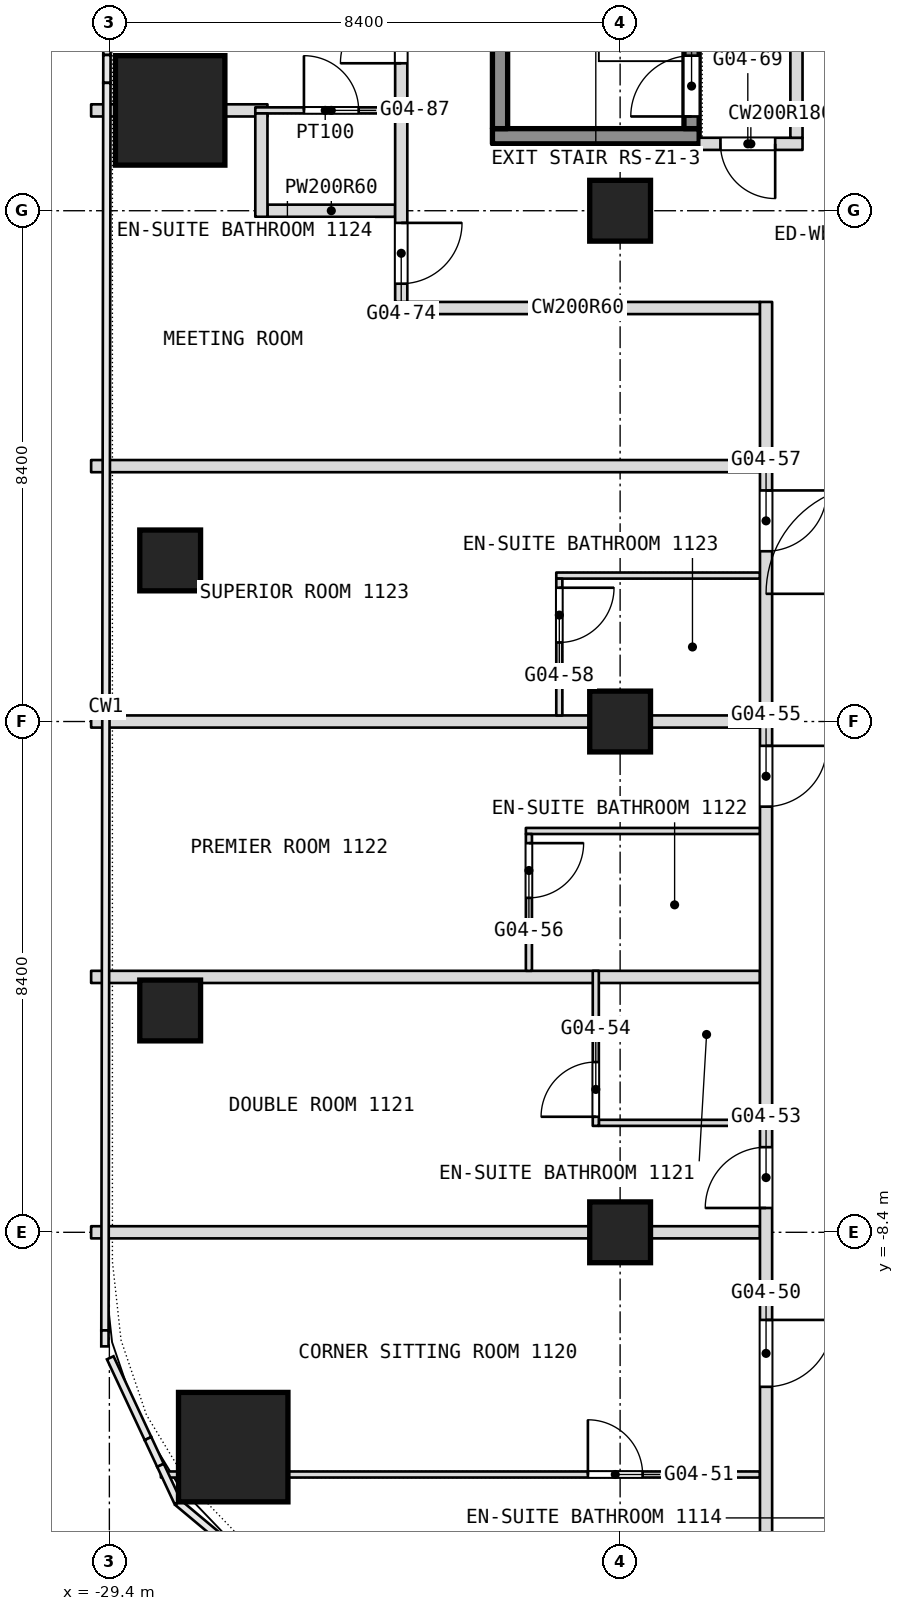
"""IFC4 building model, lengths in metres.
Left out: names, types, materials, properties, quantities, classifications, styles, units other than length and angle.
Written with IfcOpenShell. Run it as: python <this file> out.ifc"""

import sys

from ifc_helpers import new_model, si_unit, direction, frame, frame_2d, origin, origin_2d, place, context, subcontext, project, spatial, rectangle, extrude, element, fill, save


model = new_model("IFC4")
c1 = context("Model", 3, precision=1e-05, world=origin(), true_north=direction((0.0, 1.0)))
c2 = subcontext(c1, "Body", "Model", "MODEL_VIEW")
j1 = project(units=[si_unit("LENGTHUNIT", "METRE"), si_unit("PLANEANGLEUNIT", "RADIAN")], contexts=[c1])
p1 = place(None, origin())
s1 = spatial("IfcSite", under=j1, at=p1, CompositionType="ELEMENT")
p2 = place(p1, origin())
s2 = spatial("IfcBuilding", under=s1, at=p2, CompositionType="ELEMENT")
p3 = place(p2, frame((0.0, 0.0, 54.5)))
s3 = spatial("IfcBuildingStorey", under=s2, at=p3, CompositionType="ELEMENT", Elevation=54.5)
for number, where, z_axis, x_axis in (
    (1, (-27.363, -11.933, 0.0), (0.0, 0.0, 1.0), (1.0, 0.0, 0.0)),
    (2, (-28.4, 10.05, 0.0), (0.0, 0.0, 1.0), (1.0, 0.0, 0.0)),
):
    element("IfcColumn", number, at=place(p3, frame(where, z_axis=z_axis, x_axis=x_axis)), inside=s3, PredefinedType="COLUMN", context=c2, shape_type="SweptSolid", body=[
        extrude(rectangle(XDim=1.8, YDim=1.8, at=origin_2d()), origin(), (0.0, 0.0, 1.0), 3.6),
    ])
for number, where, z_axis, x_axis in (
    (3, (-21.0, -8.4, 0.0), (0.0, 0.0, 1.0), (1.0, 0.0, 0.0)),
    (4, (-21.0, 0.0, 0.0), (0.0, 0.0, 1.0), (1.0, 0.0, 0.0)),
    (5, (-21.0, 8.4, 0.0), (0.0, 0.0, 1.0), (1.0, 0.0, 0.0)),
    (6, (-28.4, -4.752, 0.0), (0.0, 0.0, 1.0), (1.0, 0.0, 0.0)),
    (7, (-28.4, 2.649, 0.0), (0.0, 0.0, 1.0), (1.0, 0.0, 0.0)),
):
    element("IfcColumn", number, at=place(p3, frame(where, z_axis=z_axis, x_axis=x_axis)), inside=s3, PredefinedType="COLUMN", context=c2, shape_type="SweptSolid", body=[
        extrude(rectangle(XDim=1.0, YDim=1.0, at=origin_2d()), origin(), (0.0, 0.0, 1.0), 3.6),
    ])
p4 = place(p3, frame((-28.553, -12.383, 0.0), z_axis=(0.0, 0.0, 1.0), x_axis=(1.0, 0.0, 0.0)))
e8 = element("IfcWall", 8, at=p4, inside=s3, PredefinedType="PARTITIONING", context=c2, shape_type="SweptSolid", body=[
    extrude(rectangle(XDim=0.29, YDim=0.1, at=frame_2d((0.145, 0.0))), origin(), (0.0, 0.0, 1.0), 3.34),
])
p5 = place(p3, frame((-26.463, -12.383, 0.0), z_axis=(0.0, 0.0, 1.0), x_axis=(1.0, 0.0, 0.0)))
e9 = element("IfcWall", 9, at=p5, inside=s3, PredefinedType="PARTITIONING", context=c2, shape_type="SweptSolid", body=[
    extrude(rectangle(XDim=7.763, YDim=0.1, at=frame_2d((3.881, 0.0))), origin(), (0.0, 0.0, 1.0), 3.34),
])
p6 = place(p5, frame((4.933, 0.0, 0.0)))
e10 = element("IfcOpeningElement", 10, at=p6, cuts=e9, PredefinedType="OPENING", context=c2, shape_type="SweptSolid", body=[
    extrude(rectangle(XDim=0.9, YDim=2.1, at=frame_2d((0.45, 1.05))), frame((0.0, 0.05, 0.0), z_axis=(0.0, -1.0, 0.0), x_axis=(1.0, 0.0, 0.0)), (0.0, 0.0, 1.0), 0.1),
])
p7 = place(p3, frame((-29.7, -8.4, 0.0), z_axis=(0.0, 0.0, 1.0), x_axis=(1.0, 0.0, 0.0)))
e11 = element("IfcWall", 11, at=p7, inside=s3, PredefinedType="PARTITIONING", context=c2, shape_type="SweptSolid", body=[
    extrude(rectangle(XDim=11.0, YDim=0.2, at=frame_2d((5.5, 0.0))), origin(), (0.0, 0.0, 1.0), 2.84),
])
p8 = place(p3, frame((-21.35, -6.6, 0.0), z_axis=(0.0, 0.0, 1.0), x_axis=(1.0, 0.0, 0.0)))
e12 = element("IfcWall", 12, at=p8, inside=s3, PredefinedType="PARTITIONING", context=c2, shape_type="SweptSolid", body=[
    extrude(rectangle(XDim=2.65, YDim=0.1, at=frame_2d((1.325, 0.0))), origin(), (0.0, 0.0, 1.0), 3.34),
])
p9 = place(p3, frame((-29.7, -4.2, 0.0), z_axis=(0.0, 0.0, 1.0), x_axis=(1.0, 0.0, 0.0)))
e13 = element("IfcWall", 13, at=p9, inside=s3, PredefinedType="PARTITIONING", context=c2, shape_type="SweptSolid", body=[
    extrude(rectangle(XDim=11.0, YDim=0.2, at=frame_2d((5.5, 0.0))), origin(), (0.0, 0.0, 1.0), 3.34),
])
p10 = place(p3, frame((-22.55, -1.8, 0.0), z_axis=(0.0, 0.0, 1.0), x_axis=(1.0, 0.0, 0.0)))
e14 = element("IfcWall", 14, at=p10, inside=s3, PredefinedType="PARTITIONING", context=c2, shape_type="SweptSolid", body=[
    extrude(rectangle(XDim=3.85, YDim=0.1, at=frame_2d((1.925, 0.0))), origin(), (0.0, 0.0, 1.0), 3.34),
])
p11 = place(p3, frame((-29.7, 0.0, 0.0), z_axis=(0.0, 0.0, 1.0), x_axis=(1.0, 0.0, 0.0)))
e15 = element("IfcWall", 15, at=p11, inside=s3, PredefinedType="PARTITIONING", context=c2, shape_type="SweptSolid", body=[
    extrude(rectangle(XDim=11.0, YDim=0.2, at=frame_2d((5.5, 0.0))), origin(), (0.0, 0.0, 1.0), 2.84),
])
p12 = place(p3, frame((-22.05, 2.4, 0.0), z_axis=(0.0, 0.0, 1.0), x_axis=(1.0, 0.0, 0.0)))
e16 = element("IfcWall", 16, at=p12, inside=s3, PredefinedType="PARTITIONING", context=c2, shape_type="SweptSolid", body=[
    extrude(rectangle(XDim=3.35, YDim=0.1, at=frame_2d((1.675, 0.0))), origin(), (0.0, 0.0, 1.0), 3.34),
])
p13 = place(p3, frame((-29.7, 4.2, 0.0), z_axis=(0.0, 0.0, 1.0), x_axis=(1.0, 0.0, 0.0)))
e17 = element("IfcWall", 17, at=p13, inside=s3, PredefinedType="PARTITIONING", context=c2, shape_type="SweptSolid", body=[
    extrude(rectangle(XDim=11.0, YDim=0.2, at=frame_2d((5.5, 0.0))), origin(), (0.0, 0.0, 1.0), 3.34),
])
p14 = place(p3, frame((-24.7, 6.8, 0.0), z_axis=(0.0, 0.0, 1.0), x_axis=(1.0, 0.0, 0.0)))
e18 = element("IfcWall", 18, at=p14, inside=s3, PredefinedType="PARTITIONING", context=c2, shape_type="SweptSolid", body=[
    extrude(rectangle(XDim=6.0, YDim=0.2, at=frame_2d((3.0, 0.0))), origin(), (0.0, 0.0, 1.0), 3.34),
])
p15 = place(p3, frame((-26.8, 8.4, 0.0), z_axis=(0.0, 0.0, 1.0), x_axis=(1.0, 0.0, 0.0)))
e19 = element("IfcWall", 19, at=p15, inside=s3, PredefinedType="PARTITIONING", context=c2, shape_type="SweptSolid", body=[
    extrude(rectangle(XDim=2.1, YDim=0.2, at=frame_2d((1.05, 0.0))), origin(), (0.0, 0.0, 1.0), 2.84),
])
p16 = place(p3, frame((-19.7, 9.5, 0.0), z_axis=(0.0, 0.0, 1.0), x_axis=(1.0, 0.0, 0.0)))
e20 = element("IfcWall", 20, at=p16, inside=s3, PredefinedType="PARTITIONING", context=c2, shape_type="SweptSolid", body=[
    extrude(rectangle(XDim=1.7, YDim=0.2, at=frame_2d((0.85, 0.0))), origin(), (0.0, 0.0, 1.0), 3.34),
])
p17 = place(p16, frame((0.35, 0.0, 0.0)))
e21 = element("IfcOpeningElement", 21, at=p17, cuts=e20, PredefinedType="OPENING", context=c2, shape_type="SweptSolid", body=[
    extrude(rectangle(XDim=0.9, YDim=2.1, at=frame_2d((0.45, 1.05))), frame((0.0, 0.1, 0.0), z_axis=(0.0, -1.0, 0.0), x_axis=(1.0, 0.0, 0.0)), (0.0, 0.0, 1.0), 0.2),
])
p18 = place(p3, frame((-29.7, 10.05, 0.0), z_axis=(0.0, 0.0, 1.0), x_axis=(1.0, 0.0, 0.0)))
e22 = element("IfcWall", 22, at=p18, inside=s3, PredefinedType="PARTITIONING", context=c2, shape_type="SweptSolid", body=[
    extrude(rectangle(XDim=0.4, YDim=0.2, at=frame_2d((0.2, 0.0))), origin(), (0.0, 0.0, 1.0), 3.34),
])
p19 = place(p3, frame((-27.5, 10.05, 0.0), z_axis=(0.0, 0.0, 1.0), x_axis=(1.0, 0.0, 0.0)))
e23 = element("IfcWall", 23, at=p19, inside=s3, PredefinedType="PARTITIONING", context=c2, shape_type="SweptSolid", body=[
    extrude(rectangle(XDim=0.7, YDim=0.2, at=frame_2d((0.35, 0.0))), origin(), (0.0, 0.0, 1.0), 3.34),
])
p20 = place(p3, frame((-27.0, 10.05, 0.0), z_axis=(0.0, 0.0, 1.0), x_axis=(1.0, 0.0, 0.0)))
e24 = element("IfcWall", 24, at=p20, inside=s3, PredefinedType="PARTITIONING", context=c2, shape_type="SweptSolid", body=[
    extrude(rectangle(XDim=2.3, YDim=0.1, at=frame_2d((1.15, 0.0))), origin(), (0.0, 0.0, 1.0), 3.34),
])
p21 = place(p20, frame((0.8, 0.0, 0.0)))
e25 = element("IfcOpeningElement", 25, at=p21, cuts=e24, PredefinedType="OPENING", context=c2, shape_type="SweptSolid", body=[
    extrude(rectangle(XDim=0.9, YDim=2.1, at=frame_2d((0.45, 1.05))), frame((0.0, 0.05, 0.0), z_axis=(0.0, -1.0, 0.0), x_axis=(1.0, 0.0, 0.0)), (0.0, 0.0, 1.0), 0.1),
])
p22 = place(p3, frame((-18.1, 9.6, 0.0), z_axis=(0.0, 0.0, 1.0), x_axis=(0.0, 1.0, 0.0)))
e26 = element("IfcWall", 26, at=p22, inside=s3, PredefinedType="PARTITIONING", context=c2, shape_type="SweptSolid", body=[
    extrude(rectangle(XDim=6.2, YDim=0.2, at=frame_2d((3.1, 0.0))), origin(), (0.0, 0.0, 1.0), 3.34),
])
p23 = place(p3, frame((-18.6, -16.665, 0.0), z_axis=(0.0, 0.0, 1.0), x_axis=(0.0, 1.0, 0.0)))
e27 = element("IfcWall", 27, at=p23, inside=s3, PredefinedType="PARTITIONING", context=c2, shape_type="SweptSolid", body=[
    extrude(rectangle(XDim=23.565, YDim=0.2, at=frame_2d((11.782, 0.0))), origin(), (0.0, 0.0, 1.0), 3.34),
])
p24 = place(p23, frame((5.724, 0.0, 0.0)))
e28 = element("IfcOpeningElement", 28, at=p24, cuts=e27, PredefinedType="OPENING", context=c2, shape_type="SweptSolid", body=[
    extrude(rectangle(XDim=1.1, YDim=2.1, at=frame_2d((0.55, 1.05))), frame((0.0, 0.1, 0.0), z_axis=(0.0, -1.0, 0.0), x_axis=(1.0, 0.0, 0.0)), (0.0, 0.0, 1.0), 0.2),
])
p25 = place(p23, frame((8.665, 0.0, 0.0)))
e29 = element("IfcOpeningElement", 29, at=p25, cuts=e27, PredefinedType="OPENING", context=c2, shape_type="SweptSolid", body=[
    extrude(rectangle(XDim=1.0, YDim=2.1, at=frame_2d((0.5, 1.05))), frame((0.0, 0.1, 0.0), z_axis=(0.0, -1.0, 0.0), x_axis=(1.0, 0.0, 0.0)), (0.0, 0.0, 1.0), 0.2),
])
p26 = place(p23, frame((15.265, 0.0, 0.0)))
e30 = element("IfcOpeningElement", 30, at=p26, cuts=e27, PredefinedType="OPENING", context=c2, shape_type="SweptSolid", body=[
    extrude(rectangle(XDim=1.0, YDim=2.1, at=frame_2d((0.5, 1.05))), frame((0.0, 0.1, 0.0), z_axis=(0.0, -1.0, 0.0), x_axis=(1.0, 0.0, 0.0)), (0.0, 0.0, 1.0), 0.2),
])
p27 = place(p23, frame((19.465, 0.0, 0.0)))
e31 = element("IfcOpeningElement", 31, at=p27, cuts=e27, PredefinedType="OPENING", context=c2, shape_type="SweptSolid", body=[
    extrude(rectangle(XDim=1.0, YDim=2.1, at=frame_2d((0.5, 1.05))), frame((0.0, 0.1, 0.0), z_axis=(0.0, -1.0, 0.0), x_axis=(1.0, 0.0, 0.0)), (0.0, 0.0, 1.0), 0.2),
])
p28 = place(p3, frame((-21.4, -6.65, 0.0), z_axis=(0.0, 0.0, 1.0), x_axis=(0.0, 1.0, 0.0)))
e32 = element("IfcWall", 32, at=p28, inside=s3, PredefinedType="PARTITIONING", context=c2, shape_type="SweptSolid", body=[
    extrude(rectangle(XDim=2.55, YDim=0.1, at=frame_2d((1.275, 0.0))), origin(), (0.0, 0.0, 1.0), 3.34),
])
p29 = place(p28, frame((0.15, 0.0, 0.0)))
e33 = element("IfcOpeningElement", 33, at=p29, cuts=e32, PredefinedType="OPENING", context=c2, shape_type="SweptSolid", body=[
    extrude(rectangle(XDim=0.9, YDim=2.1, at=frame_2d((0.45, 1.05))), frame((0.0, 0.05, 0.0), z_axis=(0.0, -1.0, 0.0), x_axis=(1.0, 0.0, 0.0)), (0.0, 0.0, 1.0), 0.1),
])
p30 = place(p3, frame((-22.0, 0.1, 0.0), z_axis=(0.0, 0.0, 1.0), x_axis=(0.0, 1.0, 0.0)))
e34 = element("IfcWall", 34, at=p30, inside=s3, PredefinedType="PARTITIONING", context=c2, shape_type="SweptSolid", body=[
    extrude(rectangle(XDim=2.25, YDim=0.1, at=frame_2d((1.125, 0.0))), origin(), (0.0, 0.0, 1.0), 3.34),
])
p31 = place(p30, frame((1.2, 0.0, 0.0)))
e35 = element("IfcOpeningElement", 35, at=p31, cuts=e34, PredefinedType="OPENING", context=c2, shape_type="SweptSolid", body=[
    extrude(rectangle(XDim=0.9, YDim=2.1, at=frame_2d((0.45, 1.05))), frame((0.0, 0.05, 0.0), z_axis=(0.0, -1.0, 0.0), x_axis=(1.0, 0.0, 0.0)), (0.0, 0.0, 1.0), 0.1),
])
p32 = place(p3, frame((-22.5, -4.1, 0.0), z_axis=(0.0, 0.0, 1.0), x_axis=(0.0, 1.0, 0.0)))
e36 = element("IfcWall", 36, at=p32, inside=s3, PredefinedType="PARTITIONING", context=c2, shape_type="SweptSolid", body=[
    extrude(rectangle(XDim=2.25, YDim=0.1, at=frame_2d((1.125, 0.0))), origin(), (0.0, 0.0, 1.0), 3.34),
])
p33 = place(p32, frame((1.2, 0.0, 0.0)))
e37 = element("IfcOpeningElement", 37, at=p33, cuts=e36, PredefinedType="OPENING", context=c2, shape_type="SweptSolid", body=[
    extrude(rectangle(XDim=0.9, YDim=2.1, at=frame_2d((0.45, 1.05))), frame((0.0, 0.05, 0.0), z_axis=(0.0, -1.0, 0.0), x_axis=(1.0, 0.0, 0.0)), (0.0, 0.0, 1.0), 0.1),
])
p34 = place(p3, frame((-24.6, 6.9, 0.0), z_axis=(0.0, 0.0, 1.0), x_axis=(0.0, 1.0, 0.0)))
e38 = element("IfcWall", 38, at=p34, inside=s3, PredefinedType="PARTITIONING", context=c2, shape_type="SweptSolid", body=[
    extrude(rectangle(XDim=11.6, YDim=0.2, at=frame_2d((5.8, 0.0))), origin(), (0.0, 0.0, 1.0), 3.34),
])
p35 = place(p34, frame((8.5, 0.0, 0.0)))
e39 = element("IfcOpeningElement", 39, at=p35, cuts=e38, PredefinedType="OPENING", context=c2, shape_type="SweptSolid", body=[
    extrude(rectangle(XDim=1.0, YDim=2.1, at=frame_2d((0.5, 1.05))), frame((0.0, 0.1, 0.0), z_axis=(0.0, -1.0, 0.0), x_axis=(1.0, 0.0, 0.0)), (0.0, 0.0, 1.0), 0.2),
])
p36 = place(p34, frame((10.2, 0.0, 0.0)))
e40 = element("IfcOpeningElement", 40, at=p36, cuts=e38, PredefinedType="OPENING", context=c2, shape_type="SweptSolid", body=[
    extrude(rectangle(XDim=1.0, YDim=2.1, at=frame_2d((0.5, 1.05))), frame((0.0, 0.1, 0.0), z_axis=(0.0, -1.0, 0.0), x_axis=(1.0, 0.0, 0.0)), (0.0, 0.0, 1.0), 0.2),
])
p37 = place(p34, frame((0.3, 0.0, 0.0)))
e41 = element("IfcOpeningElement", 41, at=p37, cuts=e38, PredefinedType="OPENING", context=c2, shape_type="SweptSolid", body=[
    extrude(rectangle(XDim=1.0, YDim=2.1, at=frame_2d((0.5, 1.05))), frame((0.0, 0.1, 0.0), z_axis=(0.0, -1.0, 0.0), x_axis=(1.0, 0.0, 0.0)), (0.0, 0.0, 1.0), 0.2),
])
p38 = place(p34, frame((3.925, 0.0, 0.0)))
e42 = element("IfcOpeningElement", 42, at=p38, cuts=e38, PredefinedType="OPENING", context=c2, shape_type="SweptSolid", body=[
    extrude(rectangle(XDim=1.0, YDim=2.1, at=frame_2d((0.5, 1.05))), frame((0.0, 0.1, 0.0), z_axis=(0.0, -1.0, 0.0), x_axis=(1.0, 0.0, 0.0)), (0.0, 0.0, 1.0), 0.2),
])
p39 = place(p3, frame((-26.9, 8.3, 0.0), z_axis=(0.0, 0.0, 1.0), x_axis=(0.0, 1.0, 0.0)))
e43 = element("IfcWall", 43, at=p39, inside=s3, PredefinedType="PARTITIONING", context=c2, shape_type="SweptSolid", body=[
    extrude(rectangle(XDim=1.7, YDim=0.2, at=frame_2d((0.85, 0.0))), origin(), (0.0, 0.0, 1.0), 3.34),
])
p40 = place(p3, frame((-23.1, 9.625, 0.1), z_axis=(0.0, 0.0, 1.0), x_axis=(1.0, 0.0, 0.0)))
e44 = element("IfcWall", 44, at=p40, inside=s3, PredefinedType="SHEAR", context=c2, shape_type="SweptSolid", body=[
    extrude(rectangle(XDim=3.4, YDim=0.25, at=frame_2d((1.7, 0.0))), origin(), (0.0, 0.0, 1.0), 3.6),
])
p41 = place(p3, frame((-22.975, 9.75, 0.1), z_axis=(0.0, 0.0, 1.0), x_axis=(0.0, 1.0, 0.0)))
e45 = element("IfcWall", 45, at=p41, inside=s3, PredefinedType="SHEAR", context=c2, shape_type="SweptSolid", body=[
    extrude(rectangle(XDim=5.7, YDim=0.25, at=frame_2d((2.85, 0.0))), origin(), (0.0, 0.0, 1.0), 3.6),
])
p42 = place(p3, frame((-19.825, 9.75, 0.1), z_axis=(0.0, 0.0, 1.0), x_axis=(0.0, 1.0, 0.0)))
e46 = element("IfcWall", 46, at=p42, inside=s3, PredefinedType="SHEAR", context=c2, shape_type="SweptSolid", body=[
    extrude(rectangle(XDim=5.7, YDim=0.25, at=frame_2d((2.85, 0.0))), origin(), (0.0, 0.0, 1.0), 3.6),
])
p43 = place(p42, frame((0.2, 0.0, 0.0)))
e47 = element("IfcOpeningElement", 47, at=p43, cuts=e46, PredefinedType="OPENING", context=c2, shape_type="SweptSolid", body=[
    extrude(rectangle(XDim=1.0, YDim=2.1, at=frame_2d((0.5, 1.05))), frame((0.0, 0.125, 0.0), z_axis=(0.0, -1.0, 0.0), x_axis=(1.0, 0.0, 0.0)), (0.0, 0.0, 1.0), 0.25),
])
p44 = place(p6, origin())
e48 = element("IfcDoor", 48, at=p44, inside=s3, OperationType="SINGLE_SWING_LEFT", PredefinedType="DOOR", context=c2, shape_type="SweptSolid", body=[
    extrude(rectangle(XDim=0.9, YDim=2.1, at=frame_2d((0.45, 1.05))), frame((0.0, 0.025, 0.0), z_axis=(0.0, -1.0, 0.0), x_axis=(1.0, 0.0, 0.0)), (0.0, 0.0, 1.0), 0.05),
])
fill(e10, e48)
p45 = place(p17, origin())
e49 = element("IfcDoor", 49, at=p45, inside=s3, OperationType="SINGLE_SWING_RIGHT", PredefinedType="DOOR", context=c2, shape_type="SweptSolid", body=[
    extrude(rectangle(XDim=0.9, YDim=2.1, at=frame_2d((0.45, 1.05))), frame((0.0, 0.025, 0.0), z_axis=(0.0, -1.0, 0.0), x_axis=(1.0, 0.0, 0.0)), (0.0, 0.0, 1.0), 0.05),
])
fill(e21, e49)
p46 = place(p21, origin())
e50 = element("IfcDoor", 50, at=p46, inside=s3, OperationType="SINGLE_SWING_LEFT", PredefinedType="DOOR", context=c2, shape_type="SweptSolid", body=[
    extrude(rectangle(XDim=0.9, YDim=2.1, at=frame_2d((0.45, 1.05))), frame((0.0, 0.025, 0.0), z_axis=(0.0, -1.0, 0.0), x_axis=(1.0, 0.0, 0.0)), (0.0, 0.0, 1.0), 0.05),
])
fill(e25, e50)
p47 = place(p24, origin())
e51 = element("IfcDoor", 51, at=p47, inside=s3, OperationType="SINGLE_SWING_RIGHT", PredefinedType="DOOR", context=c2, shape_type="SweptSolid", body=[
    extrude(rectangle(XDim=1.1, YDim=2.1, at=frame_2d((0.55, 1.05))), frame((0.0, 0.025, 0.0), z_axis=(0.0, -1.0, 0.0), x_axis=(1.0, 0.0, 0.0)), (0.0, 0.0, 1.0), 0.05),
])
fill(e28, e51)
p48 = place(p25, origin())
e52 = element("IfcDoor", 52, at=p48, inside=s3, OperationType="SINGLE_SWING_RIGHT", PredefinedType="DOOR", context=c2, shape_type="SweptSolid", body=[
    extrude(rectangle(XDim=1.0, YDim=2.1, at=frame_2d((0.5, 1.05))), frame((0.0, 0.025, 0.0), z_axis=(0.0, -1.0, 0.0), x_axis=(1.0, 0.0, 0.0)), (0.0, 0.0, 1.0), 0.05),
])
fill(e29, e52)
p49 = place(p26, origin())
e53 = element("IfcDoor", 53, at=p49, inside=s3, OperationType="SINGLE_SWING_RIGHT", PredefinedType="DOOR", context=c2, shape_type="SweptSolid", body=[
    extrude(rectangle(XDim=1.0, YDim=2.1, at=frame_2d((0.5, 1.05))), frame((0.0, 0.025, 0.0), z_axis=(0.0, -1.0, 0.0), x_axis=(1.0, 0.0, 0.0)), (0.0, 0.0, 1.0), 0.05),
])
fill(e30, e53)
p50 = place(p27, origin())
e54 = element("IfcDoor", 54, at=p50, inside=s3, OperationType="SINGLE_SWING_RIGHT", PredefinedType="DOOR", context=c2, shape_type="SweptSolid", body=[
    extrude(rectangle(XDim=1.0, YDim=2.1, at=frame_2d((0.5, 1.05))), frame((0.0, 0.025, 0.0), z_axis=(0.0, -1.0, 0.0), x_axis=(1.0, 0.0, 0.0)), (0.0, 0.0, 1.0), 0.05),
])
fill(e31, e54)
p51 = place(p29, origin())
e55 = element("IfcDoor", 55, at=p51, inside=s3, OperationType="SINGLE_SWING_RIGHT", PredefinedType="DOOR", context=c2, shape_type="SweptSolid", body=[
    extrude(rectangle(XDim=0.9, YDim=2.1, at=frame_2d((0.45, 1.05))), frame((0.0, 0.025, 0.0), z_axis=(0.0, -1.0, 0.0), x_axis=(1.0, 0.0, 0.0)), (0.0, 0.0, 1.0), 0.05),
])
fill(e33, e55)
p52 = place(p31, origin())
e56 = element("IfcDoor", 56, at=p52, inside=s3, OperationType="SINGLE_SWING_LEFT", PredefinedType="DOOR", context=c2, shape_type="SweptSolid", body=[
    extrude(rectangle(XDim=0.9, YDim=2.1, at=frame_2d((0.45, 1.05))), frame((0.0, 0.025, 0.0), z_axis=(0.0, -1.0, 0.0), x_axis=(1.0, 0.0, 0.0)), (0.0, 0.0, 1.0), 0.05),
])
fill(e35, e56)
p53 = place(p33, origin())
e57 = element("IfcDoor", 57, at=p53, inside=s3, OperationType="SINGLE_SWING_LEFT", PredefinedType="DOOR", context=c2, shape_type="SweptSolid", body=[
    extrude(rectangle(XDim=0.9, YDim=2.1, at=frame_2d((0.45, 1.05))), frame((0.0, 0.025, 0.0), z_axis=(0.0, -1.0, 0.0), x_axis=(1.0, 0.0, 0.0)), (0.0, 0.0, 1.0), 0.05),
])
fill(e37, e57)
p54 = place(p37, origin())
e58 = element("IfcDoor", 58, at=p54, inside=s3, OperationType="SINGLE_SWING_LEFT", PredefinedType="DOOR", context=c2, shape_type="SweptSolid", body=[
    extrude(rectangle(XDim=1.0, YDim=2.1, at=frame_2d((0.5, 1.05))), frame((0.0, 0.025, 0.0), z_axis=(0.0, -1.0, 0.0), x_axis=(1.0, 0.0, 0.0)), (0.0, 0.0, 1.0), 0.05),
])
fill(e41, e58)
p55 = place(p38, origin())
e59 = element("IfcDoor", 59, at=p55, inside=s3, OperationType="SINGLE_SWING_LEFT", PredefinedType="DOOR", context=c2, shape_type="SweptSolid", body=[
    extrude(rectangle(XDim=1.0, YDim=2.1, at=frame_2d((0.5, 1.05))), frame((0.0, 0.025, 0.0), z_axis=(0.0, -1.0, 0.0), x_axis=(1.0, 0.0, 0.0)), (0.0, 0.0, 1.0), 0.05),
])
fill(e42, e59)
p56 = place(p43, origin())
e60 = element("IfcDoor", 60, at=p56, inside=s3, OperationType="SINGLE_SWING_LEFT", PredefinedType="DOOR", context=c2, shape_type="SweptSolid", body=[
    extrude(rectangle(XDim=1.0, YDim=2.1, at=frame_2d((0.5, 1.05))), frame((0.0, 0.025, 0.0), z_axis=(0.0, -1.0, 0.0), x_axis=(1.0, 0.0, 0.0)), (0.0, 0.0, 1.0), 0.05),
])
fill(e47, e60)
save(model, sys.argv[1])
